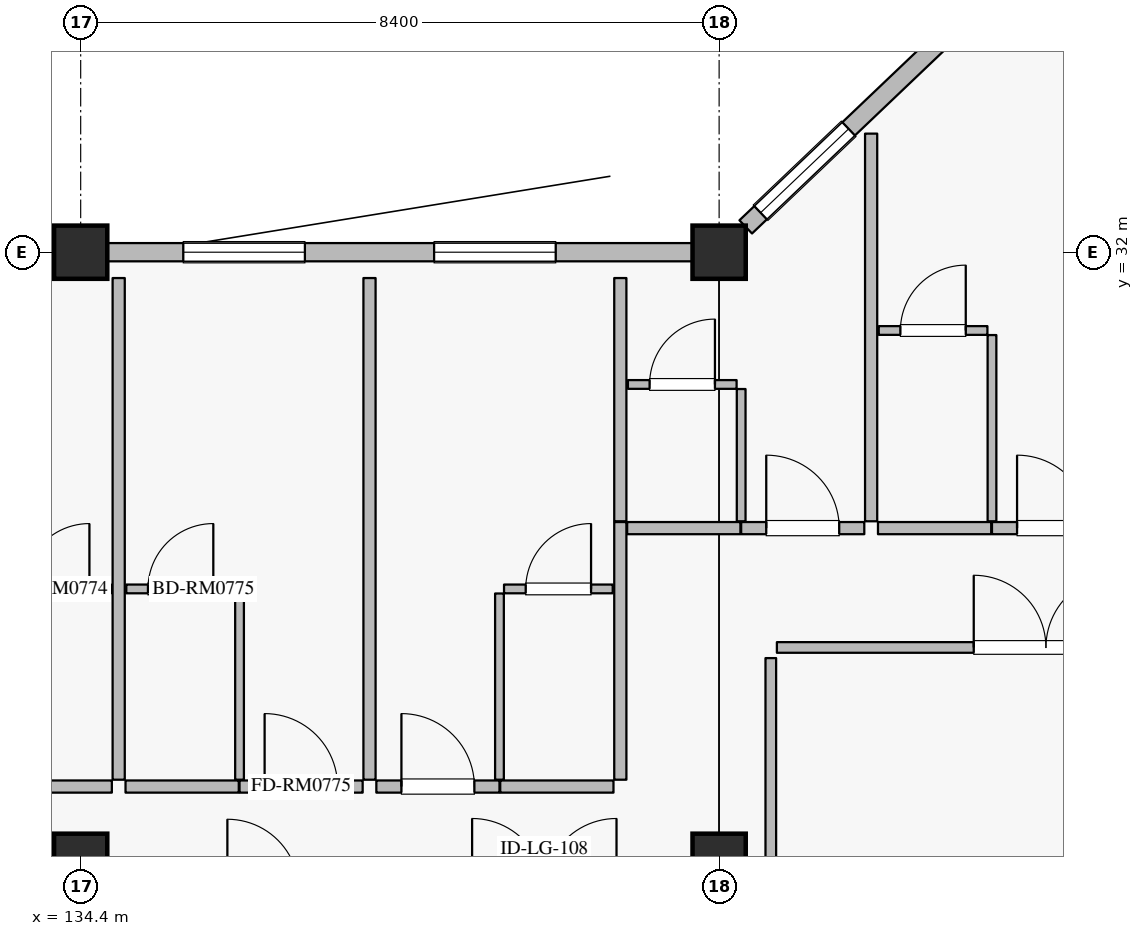
"""IFC4 building model, lengths in metres.
Left out: names, types, materials, properties, quantities, classifications, styles, units other than length and angle.
Written with IfcOpenShell. Run it as: python <this file> out.ifc"""

import sys

from ifc_helpers import new_model, si_unit, direction, frame, frame_2d, origin, origin_2d, place, context, subcontext, project, spatial, rectangle, extrude, element, fill, save


model = new_model("IFC4")
c1 = context("Model", 3, precision=1e-05, world=origin(), true_north=direction((0.0, 1.0)))
c2 = subcontext(c1, "Body", "Model", "MODEL_VIEW")
j1 = project(units=[si_unit("LENGTHUNIT", "METRE"), si_unit("PLANEANGLEUNIT", "RADIAN")], contexts=[c1])
p1 = place(None, origin())
s1 = spatial("IfcSite", under=j1, at=p1, CompositionType="ELEMENT")
p2 = place(p1, origin())
s2 = spatial("IfcBuilding", under=s1, at=p2, CompositionType="ELEMENT")
p3 = place(p2, frame((0.0, 0.0, 28.8)))
s3 = spatial("IfcBuildingStorey", under=s2, at=p3, CompositionType="ELEMENT", Elevation=28.8)
for number, where, z_axis, x_axis in (
    (1, (134.4, 32.0, 0.0), (0.0, 0.0, 1.0), (1.0, 0.0, 0.0)),
    (2, (142.8, 32.0, 0.0), (0.0, 0.0, 1.0), (1.0, 0.0, 0.0)),
    (3, (134.4, 24.0, 0.0), (0.0, 0.0, 1.0), (1.0, 0.0, 0.0)),
    (4, (142.8, 24.0, 0.0), (0.0, 0.0, 1.0), (1.0, 0.0, 0.0)),
):
    element("IfcColumn", number, at=place(p3, frame(where, z_axis=z_axis, x_axis=x_axis)), inside=s3, PredefinedType="COLUMN", context=c2, shape_type="SweptSolid", body=[
        extrude(rectangle(XDim=0.7, YDim=0.7, at=origin_2d()), origin(), (0.0, 0.0, 1.0), 3.6),
    ])
p4 = place(p3, frame((126.35, 32.0, 0.0), z_axis=(0.0, 0.0, 1.0), x_axis=(1.0, 0.0, 0.0)))
e5 = element("IfcWall", 5, at=p4, inside=s3, PredefinedType="SOLIDWALL", context=c2, shape_type="SweptSolid", body=[
    extrude(rectangle(XDim=7.7, YDim=0.24, at=frame_2d((3.85, 0.0))), origin(), (0.0, 0.0, 1.0), 2.93),
])
p5 = place(p4, frame((0.125, 0.0, 0.8)))
e6 = element("IfcOpeningElement", 6, at=p5, cuts=e5, PredefinedType="OPENING", context=c2, shape_type="SweptSolid", body=[
    extrude(rectangle(XDim=1.6, YDim=1.6, at=frame_2d((0.8, 0.8))), frame((0.0, 0.13, 0.0), z_axis=(0.0, -1.0, 0.0), x_axis=(1.0, 0.0, 0.0)), (0.0, 0.0, 1.0), 0.26),
])
p6 = place(p4, frame((2.8, 0.0, 0.8)))
e7 = element("IfcOpeningElement", 7, at=p6, cuts=e5, PredefinedType="OPENING", context=c2, shape_type="SweptSolid", body=[
    extrude(rectangle(XDim=1.6, YDim=1.6, at=frame_2d((0.8, 0.8))), frame((0.0, 0.13, 0.0), z_axis=(0.0, -1.0, 0.0), x_axis=(1.0, 0.0, 0.0)), (0.0, 0.0, 1.0), 0.26),
])
p7 = place(p4, frame((5.725, 0.0, 0.8)))
e8 = element("IfcOpeningElement", 8, at=p7, cuts=e5, PredefinedType="OPENING", context=c2, shape_type="SweptSolid", body=[
    extrude(rectangle(XDim=1.6, YDim=1.6, at=frame_2d((0.8, 0.8))), frame((0.0, 0.13, 0.0), z_axis=(0.0, -1.0, 0.0), x_axis=(1.0, 0.0, 0.0)), (0.0, 0.0, 1.0), 0.26),
])
p8 = place(p3, frame((134.75, 32.0, 0.0), z_axis=(0.0, 0.0, 1.0), x_axis=(1.0, 0.0, 0.0)))
e9 = element("IfcWall", 9, at=p8, inside=s3, PredefinedType="SOLIDWALL", context=c2, shape_type="SweptSolid", body=[
    extrude(rectangle(XDim=7.7, YDim=0.24, at=frame_2d((3.85, 0.0))), origin(), (0.0, 0.0, 1.0), 2.93),
])
p9 = place(p8, frame((1.0, 0.0, 0.8)))
e10 = element("IfcOpeningElement", 10, at=p9, cuts=e9, PredefinedType="OPENING", context=c2, shape_type="SweptSolid", body=[
    extrude(rectangle(XDim=1.6, YDim=1.6, at=frame_2d((0.8, 0.8))), frame((0.0, 0.13, 0.0), z_axis=(0.0, -1.0, 0.0), x_axis=(1.0, 0.0, 0.0)), (0.0, 0.0, 1.0), 0.26),
])
p10 = place(p8, frame((4.3, 0.0, 0.8)))
e11 = element("IfcOpeningElement", 11, at=p10, cuts=e9, PredefinedType="OPENING", context=c2, shape_type="SweptSolid", body=[
    extrude(rectangle(XDim=1.6, YDim=1.6, at=frame_2d((0.8, 0.8))), frame((0.0, 0.13, 0.0), z_axis=(0.0, -1.0, 0.0), x_axis=(1.0, 0.0, 0.0)), (0.0, 0.0, 1.0), 0.26),
])
p11 = place(p3, frame((143.15, 32.333, 0.0), z_axis=(0.0, 0.0, 1.0), x_axis=(0.724116091282, 0.689678103427, 0.0)))
e12 = element("IfcWall", 12, at=p11, inside=s3, PredefinedType="SOLIDWALL", context=c2, shape_type="SweptSolid", body=[
    extrude(rectangle(XDim=10.634, YDim=0.24, at=frame_2d((5.317, 0.0))), origin(), (0.0, 0.0, 1.0), 2.93),
])
p12 = place(p11, frame((0.27, 0.0, 0.8)))
e13 = element("IfcOpeningElement", 13, at=p12, cuts=e12, PredefinedType="OPENING", context=c2, shape_type="SweptSolid", body=[
    extrude(rectangle(XDim=1.6, YDim=1.6, at=frame_2d((0.8, 0.8))), frame((0.0, 0.13, 0.0), z_axis=(0.0, -1.0, 0.0), x_axis=(1.0, 0.0, 0.0)), (0.0, 0.0, 1.0), 0.26),
])
p13 = place(p11, frame((3.757, 0.0, 0.8)))
e14 = element("IfcOpeningElement", 14, at=p13, cuts=e12, PredefinedType="OPENING", context=c2, shape_type="SweptSolid", body=[
    extrude(rectangle(XDim=1.6, YDim=1.6, at=frame_2d((0.8, 0.8))), frame((0.0, 0.13, 0.0), z_axis=(0.0, -1.0, 0.0), x_axis=(1.0, 0.0, 0.0)), (0.0, 0.0, 1.0), 0.26),
])
p14 = place(p11, frame((8.004, 0.0, 0.8)))
e15 = element("IfcOpeningElement", 15, at=p14, cuts=e12, PredefinedType="OPENING", context=c2, shape_type="SweptSolid", body=[
    extrude(rectangle(XDim=1.6, YDim=1.6, at=frame_2d((0.8, 0.8))), frame((0.0, 0.13, 0.0), z_axis=(0.0, -1.0, 0.0), x_axis=(1.0, 0.0, 0.0)), (0.0, 0.0, 1.0), 0.26),
])
p15 = place(p3, frame((133.32, 24.97, 0.0), z_axis=(0.0, 0.0, 1.0), x_axis=(1.0, 0.0, 0.0)))
e16 = element("IfcWall", 16, at=p15, inside=s3, PredefinedType="PARTITIONING", context=c2, shape_type="SweptSolid", body=[
    extrude(rectangle(XDim=1.49, YDim=0.16, at=frame_2d((0.745, 0.0))), origin(), (0.0, 0.0, 1.0), 3.365),
])
p16 = place(p3, frame((133.37, 27.57, 0.0), z_axis=(0.0, 0.0, 1.0), x_axis=(1.0, 0.0, 0.0)))
e17 = element("IfcWall", 17, at=p16, inside=s3, PredefinedType="PARTITIONING", context=c2, shape_type="SweptSolid", body=[
    extrude(rectangle(XDim=1.43, YDim=0.115, at=frame_2d((0.715, 0.0))), origin(), (0.0, 0.0, 1.0), 3.365),
])
p17 = place(p16, frame((0.285, 0.0, 0.0)))
e18 = element("IfcOpeningElement", 18, at=p17, cuts=e17, PredefinedType="OPENING", context=c2, shape_type="SweptSolid", body=[
    extrude(rectangle(XDim=0.86, YDim=2.12, at=frame_2d((0.43, 1.06))), frame((0.0, 0.067, 0.0), z_axis=(0.0, -1.0, 0.0), x_axis=(1.0, 0.0, 0.0)), (0.0, 0.0, 1.0), 0.135),
])
p18 = place(p3, frame((134.99, 24.97, 0.0), z_axis=(0.0, 0.0, 1.0), x_axis=(1.0, 0.0, 0.0)))
e19 = element("IfcWall", 19, at=p18, inside=s3, PredefinedType="PARTITIONING", context=c2, shape_type="SweptSolid", body=[
    extrude(rectangle(XDim=1.49, YDim=0.16, at=frame_2d((0.745, 0.0))), origin(), (0.0, 0.0, 1.0), 3.365),
])
p19 = place(p3, frame((136.49, 24.97, 0.0), z_axis=(0.0, 0.0, 1.0), x_axis=(1.0, 0.0, 0.0)))
e20 = element("IfcWall", 20, at=p19, inside=s3, PredefinedType="PARTITIONING", context=c2, shape_type="SweptSolid", body=[
    extrude(rectangle(XDim=1.62, YDim=0.16, at=frame_2d((0.81, 0.0))), origin(), (0.0, 0.0, 1.0), 3.365),
])
p20 = place(p19, frame((0.33, 0.0, 0.0)))
e21 = element("IfcOpeningElement", 21, at=p20, cuts=e20, PredefinedType="OPENING", context=c2, shape_type="SweptSolid", body=[
    extrude(rectangle(XDim=0.96, YDim=2.2, at=frame_2d((0.48, 1.1))), frame((0.0, 0.09, 0.0), z_axis=(0.0, -1.0, 0.0), x_axis=(1.0, 0.0, 0.0)), (0.0, 0.0, 1.0), 0.18),
])
p21 = place(p3, frame((136.49, 25.06, 0.0), z_axis=(0.0, 0.0, 1.0), x_axis=(0.0, 1.0, 0.0)))
e22 = element("IfcWall", 22, at=p21, inside=s3, PredefinedType="PARTITIONING", context=c2, shape_type="SweptSolid", body=[
    extrude(rectangle(XDim=2.45, YDim=0.115, at=frame_2d((1.225, 0.0))), origin(), (0.0, 0.0, 1.0), 3.365),
])
p22 = place(p3, frame((135.0, 27.57, 0.0), z_axis=(0.0, 0.0, 1.0), x_axis=(1.0, 0.0, 0.0)))
e23 = element("IfcWall", 23, at=p22, inside=s3, PredefinedType="PARTITIONING", context=c2, shape_type="SweptSolid", body=[
    extrude(rectangle(XDim=1.43, YDim=0.115, at=frame_2d((0.715, 0.0))), origin(), (0.0, 0.0, 1.0), 3.365),
])
p23 = place(p22, frame((0.285, 0.0, 0.0)))
e24 = element("IfcOpeningElement", 24, at=p23, cuts=e23, PredefinedType="OPENING", context=c2, shape_type="SweptSolid", body=[
    extrude(rectangle(XDim=0.86, YDim=2.12, at=frame_2d((0.43, 1.06))), frame((0.0, 0.067, 0.0), z_axis=(0.0, -1.0, 0.0), x_axis=(1.0, 0.0, 0.0)), (0.0, 0.0, 1.0), 0.135),
])
p24 = place(p3, frame((134.9, 25.06, 0.0), z_axis=(0.0, 0.0, 1.0), x_axis=(0.0, 1.0, 0.0)))
e25 = element("IfcWall", 25, at=p24, inside=s3, PredefinedType="PARTITIONING", context=c2, shape_type="SweptSolid", body=[
    extrude(rectangle(XDim=6.6, YDim=0.16, at=frame_2d((3.3, 0.0))), origin(), (0.0, 0.0, 1.0), 3.365),
])
p25 = place(p3, frame((138.29, 24.97, 0.0), z_axis=(0.0, 0.0, 1.0), x_axis=(1.0, 0.0, 0.0)))
e26 = element("IfcWall", 26, at=p25, inside=s3, PredefinedType="PARTITIONING", context=c2, shape_type="SweptSolid", body=[
    extrude(rectangle(XDim=1.62, YDim=0.16, at=frame_2d((0.81, 0.0))), origin(), (0.0, 0.0, 1.0), 3.365),
])
p26 = place(p25, frame((0.33, 0.0, 0.0)))
e27 = element("IfcOpeningElement", 27, at=p26, cuts=e26, PredefinedType="OPENING", context=c2, shape_type="SweptSolid", body=[
    extrude(rectangle(XDim=0.96, YDim=2.2, at=frame_2d((0.48, 1.1))), frame((0.0, 0.09, 0.0), z_axis=(0.0, -1.0, 0.0), x_axis=(1.0, 0.0, 0.0)), (0.0, 0.0, 1.0), 0.18),
])
p27 = place(p3, frame((139.92, 24.97, 0.0), z_axis=(0.0, 0.0, 1.0), x_axis=(1.0, 0.0, 0.0)))
e28 = element("IfcWall", 28, at=p27, inside=s3, PredefinedType="PARTITIONING", context=c2, shape_type="SweptSolid", body=[
    extrude(rectangle(XDim=1.49, YDim=0.16, at=frame_2d((0.745, 0.0))), origin(), (0.0, 0.0, 1.0), 3.365),
])
p28 = place(p3, frame((139.91, 25.06, 0.0), z_axis=(0.0, 0.0, 1.0), x_axis=(0.0, 1.0, 0.0)))
e29 = element("IfcWall", 29, at=p28, inside=s3, PredefinedType="PARTITIONING", context=c2, shape_type="SweptSolid", body=[
    extrude(rectangle(XDim=2.45, YDim=0.115, at=frame_2d((1.225, 0.0))), origin(), (0.0, 0.0, 1.0), 3.365),
])
p29 = place(p3, frame((139.97, 27.57, 0.0), z_axis=(0.0, 0.0, 1.0), x_axis=(1.0, 0.0, 0.0)))
e30 = element("IfcWall", 30, at=p29, inside=s3, PredefinedType="PARTITIONING", context=c2, shape_type="SweptSolid", body=[
    extrude(rectangle(XDim=1.43, YDim=0.115, at=frame_2d((0.715, 0.0))), origin(), (0.0, 0.0, 1.0), 3.365),
])
p30 = place(p29, frame((0.285, 0.0, 0.0)))
e31 = element("IfcOpeningElement", 31, at=p30, cuts=e30, PredefinedType="OPENING", context=c2, shape_type="SweptSolid", body=[
    extrude(rectangle(XDim=0.86, YDim=2.12, at=frame_2d((0.43, 1.06))), frame((0.0, 0.067, 0.0), z_axis=(0.0, -1.0, 0.0), x_axis=(1.0, 0.0, 0.0)), (0.0, 0.0, 1.0), 0.135),
])
p31 = place(p3, frame((138.2, 25.06, 0.0), z_axis=(0.0, 0.0, 1.0), x_axis=(0.0, 1.0, 0.0)))
e32 = element("IfcWall", 32, at=p31, inside=s3, PredefinedType="PARTITIONING", context=c2, shape_type="SweptSolid", body=[
    extrude(rectangle(XDim=6.6, YDim=0.16, at=frame_2d((3.3, 0.0))), origin(), (0.0, 0.0, 1.0), 3.365),
])
p32 = place(p3, frame((141.5, 25.06, 0.0), z_axis=(0.0, 0.0, 1.0), x_axis=(0.0, 1.0, 0.0)))
e33 = element("IfcWall", 33, at=p32, inside=s3, PredefinedType="PARTITIONING", context=c2, shape_type="SweptSolid", body=[
    extrude(rectangle(XDim=3.39, YDim=0.16, at=frame_2d((1.695, 0.0))), origin(), (0.0, 0.0, 1.0), 3.365),
])
p33 = place(p3, frame((141.59, 28.37, 0.0), z_axis=(0.0, 0.0, 1.0), x_axis=(1.0, 0.0, 0.0)))
e34 = element("IfcWall", 34, at=p33, inside=s3, PredefinedType="PARTITIONING", context=c2, shape_type="SweptSolid", body=[
    extrude(rectangle(XDim=1.49, YDim=0.16, at=frame_2d((0.745, 0.0))), origin(), (0.0, 0.0, 1.0), 3.365),
])
p34 = place(p3, frame((143.09, 28.37, 0.0), z_axis=(0.0, 0.0, 1.0), x_axis=(1.0, 0.0, 0.0)))
e35 = element("IfcWall", 35, at=p34, inside=s3, PredefinedType="PARTITIONING", context=c2, shape_type="SweptSolid", body=[
    extrude(rectangle(XDim=1.62, YDim=0.16, at=frame_2d((0.81, 0.0))), origin(), (0.0, 0.0, 1.0), 3.365),
])
p35 = place(p34, frame((0.33, 0.0, 0.0)))
e36 = element("IfcOpeningElement", 36, at=p35, cuts=e35, PredefinedType="OPENING", context=c2, shape_type="SweptSolid", body=[
    extrude(rectangle(XDim=0.96, YDim=2.2, at=frame_2d((0.48, 1.1))), frame((0.0, 0.09, 0.0), z_axis=(0.0, -1.0, 0.0), x_axis=(1.0, 0.0, 0.0)), (0.0, 0.0, 1.0), 0.18),
])
p36 = place(p3, frame((143.09, 28.46, 0.0), z_axis=(0.0, 0.0, 1.0), x_axis=(0.0, 1.0, 0.0)))
e37 = element("IfcWall", 37, at=p36, inside=s3, PredefinedType="PARTITIONING", context=c2, shape_type="SweptSolid", body=[
    extrude(rectangle(XDim=1.74, YDim=0.115, at=frame_2d((0.87, 0.0))), origin(), (0.0, 0.0, 1.0), 3.365),
])
p37 = place(p3, frame((141.6, 30.26, 0.0), z_axis=(0.0, 0.0, 1.0), x_axis=(1.0, 0.0, 0.0)))
e38 = element("IfcWall", 38, at=p37, inside=s3, PredefinedType="PARTITIONING", context=c2, shape_type="SweptSolid", body=[
    extrude(rectangle(XDim=1.43, YDim=0.115, at=frame_2d((0.715, 0.0))), origin(), (0.0, 0.0, 1.0), 3.365),
])
p38 = place(p37, frame((0.285, 0.0, 0.0)))
e39 = element("IfcOpeningElement", 39, at=p38, cuts=e38, PredefinedType="OPENING", context=c2, shape_type="SweptSolid", body=[
    extrude(rectangle(XDim=0.86, YDim=2.12, at=frame_2d((0.43, 1.06))), frame((0.0, 0.067, 0.0), z_axis=(0.0, -1.0, 0.0), x_axis=(1.0, 0.0, 0.0)), (0.0, 0.0, 1.0), 0.135),
])
p39 = place(p3, frame((141.5, 28.46, 0.0), z_axis=(0.0, 0.0, 1.0), x_axis=(0.0, 1.0, 0.0)))
e40 = element("IfcWall", 40, at=p39, inside=s3, PredefinedType="PARTITIONING", context=c2, shape_type="SweptSolid", body=[
    extrude(rectangle(XDim=3.2, YDim=0.16, at=frame_2d((1.6, 0.0))), origin(), (0.0, 0.0, 1.0), 3.365),
])
p40 = place(p3, frame((144.89, 28.37, 0.0), z_axis=(0.0, 0.0, 1.0), x_axis=(1.0, 0.0, 0.0)))
e41 = element("IfcWall", 41, at=p40, inside=s3, PredefinedType="PARTITIONING", context=c2, shape_type="SweptSolid", body=[
    extrude(rectangle(XDim=1.49, YDim=0.16, at=frame_2d((0.745, 0.0))), origin(), (0.0, 0.0, 1.0), 3.365),
])
p41 = place(p3, frame((146.39, 28.37, 0.0), z_axis=(0.0, 0.0, 1.0), x_axis=(1.0, 0.0, 0.0)))
e42 = element("IfcWall", 42, at=p41, inside=s3, PredefinedType="PARTITIONING", context=c2, shape_type="SweptSolid", body=[
    extrude(rectangle(XDim=1.62, YDim=0.16, at=frame_2d((0.81, 0.0))), origin(), (0.0, 0.0, 1.0), 3.365),
])
p42 = place(p41, frame((0.33, 0.0, 0.0)))
e43 = element("IfcOpeningElement", 43, at=p42, cuts=e42, PredefinedType="OPENING", context=c2, shape_type="SweptSolid", body=[
    extrude(rectangle(XDim=0.96, YDim=2.2, at=frame_2d((0.48, 1.1))), frame((0.0, 0.09, 0.0), z_axis=(0.0, -1.0, 0.0), x_axis=(1.0, 0.0, 0.0)), (0.0, 0.0, 1.0), 0.18),
])
p43 = place(p3, frame((146.39, 28.46, 0.0), z_axis=(0.0, 0.0, 1.0), x_axis=(0.0, 1.0, 0.0)))
e44 = element("IfcWall", 44, at=p43, inside=s3, PredefinedType="PARTITIONING", context=c2, shape_type="SweptSolid", body=[
    extrude(rectangle(XDim=2.45, YDim=0.115, at=frame_2d((1.225, 0.0))), origin(), (0.0, 0.0, 1.0), 3.365),
])
p44 = place(p3, frame((144.9, 30.97, 0.0), z_axis=(0.0, 0.0, 1.0), x_axis=(1.0, 0.0, 0.0)))
e45 = element("IfcWall", 45, at=p44, inside=s3, PredefinedType="PARTITIONING", context=c2, shape_type="SweptSolid", body=[
    extrude(rectangle(XDim=1.43, YDim=0.115, at=frame_2d((0.715, 0.0))), origin(), (0.0, 0.0, 1.0), 3.365),
])
p45 = place(p44, frame((0.285, 0.0, 0.0)))
e46 = element("IfcOpeningElement", 46, at=p45, cuts=e45, PredefinedType="OPENING", context=c2, shape_type="SweptSolid", body=[
    extrude(rectangle(XDim=0.86, YDim=2.12, at=frame_2d((0.43, 1.06))), frame((0.0, 0.067, 0.0), z_axis=(0.0, -1.0, 0.0), x_axis=(1.0, 0.0, 0.0)), (0.0, 0.0, 1.0), 0.135),
])
p46 = place(p3, frame((144.8, 28.46, 0.0), z_axis=(0.0, 0.0, 1.0), x_axis=(0.0, 1.0, 0.0)))
e47 = element("IfcWall", 47, at=p46, inside=s3, PredefinedType="PARTITIONING", context=c2, shape_type="SweptSolid", body=[
    extrude(rectangle(XDim=5.1, YDim=0.16, at=frame_2d((2.55, 0.0))), origin(), (0.0, 0.0, 1.0), 3.365),
])
p47 = place(p3, frame((143.56, 26.8, 0.0), z_axis=(0.0, 0.0, 1.0), x_axis=(1.0, 0.0, 0.0)))
e48 = element("IfcWall", 48, at=p47, inside=s3, PredefinedType="PARTITIONING", context=c2, shape_type="SweptSolid", body=[
    extrude(rectangle(XDim=7.08, YDim=0.14, at=frame_2d((3.54, 0.0))), origin(), (0.0, 0.0, 1.0), 3.365),
])
p48 = place(p47, frame((2.59, 0.0, 0.0)))
e49 = element("IfcOpeningElement", 49, at=p48, cuts=e48, PredefinedType="OPENING", context=c2, shape_type="SweptSolid", body=[
    extrude(rectangle(XDim=1.9, YDim=2.4, at=frame_2d((0.95, 1.2))), frame((0.0, 0.08, 0.0), z_axis=(0.0, -1.0, 0.0), x_axis=(1.0, 0.0, 0.0)), (0.0, 0.0, 1.0), 0.16),
])
p49 = place(p3, frame((143.48, 23.45, 0.0), z_axis=(0.0, 0.0, 1.0), x_axis=(0.0, 1.0, 0.0)))
e50 = element("IfcWall", 50, at=p49, inside=s3, PredefinedType="PARTITIONING", context=c2, shape_type="SweptSolid", body=[
    extrude(rectangle(XDim=3.21, YDim=0.14, at=frame_2d((1.605, 0.0))), origin(), (0.0, 0.0, 1.0), 3.365),
])
p50 = place(p9, origin())
e51 = element("IfcWindow", 51, at=p50, inside=s3, PartitioningType="SINGLE_PANEL", PredefinedType="WINDOW", context=c2, shape_type="SweptSolid", body=[
    extrude(rectangle(XDim=1.6, YDim=1.6, at=frame_2d((0.8, 0.8))), frame((0.0, 0.03, 0.0), z_axis=(0.0, -1.0, 0.0), x_axis=(1.0, 0.0, 0.0)), (0.0, 0.0, 1.0), 0.06),
])
fill(e10, e51)
p51 = place(p10, origin())
e52 = element("IfcWindow", 52, at=p51, inside=s3, PartitioningType="SINGLE_PANEL", PredefinedType="WINDOW", context=c2, shape_type="SweptSolid", body=[
    extrude(rectangle(XDim=1.6, YDim=1.6, at=frame_2d((0.8, 0.8))), frame((0.0, 0.03, 0.0), z_axis=(0.0, -1.0, 0.0), x_axis=(1.0, 0.0, 0.0)), (0.0, 0.0, 1.0), 0.06),
])
fill(e11, e52)
p52 = place(p12, origin())
e53 = element("IfcWindow", 53, at=p52, inside=s3, PartitioningType="SINGLE_PANEL", PredefinedType="WINDOW", context=c2, shape_type="SweptSolid", body=[
    extrude(rectangle(XDim=1.6, YDim=1.6, at=frame_2d((0.8, 0.8))), frame((0.0, 0.03, 0.0), z_axis=(0.0, -1.0, 0.0), x_axis=(1.0, 0.0, 0.0)), (0.0, 0.0, 1.0), 0.06),
])
fill(e13, e53)
p53 = place(p17, origin())
e54 = element("IfcDoor", 54, at=p53, inside=s3, OperationType="SINGLE_SWING_RIGHT", PredefinedType="DOOR", context=c2, shape_type="SweptSolid", body=[
    extrude(rectangle(XDim=0.86, YDim=2.12, at=frame_2d((0.43, 1.06))), frame((0.0, 0.025, 0.0), z_axis=(0.0, -1.0, 0.0), x_axis=(1.0, 0.0, 0.0)), (0.0, 0.0, 1.0), 0.05),
])
fill(e18, e54)
p54 = place(p20, origin())
e55 = element("IfcDoor", 55, at=p54, inside=s3, OperationType="SINGLE_SWING_LEFT", PredefinedType="DOOR", context=c2, shape_type="SweptSolid", body=[
    extrude(rectangle(XDim=0.96, YDim=2.2, at=frame_2d((0.48, 1.1))), frame((0.0, 0.025, 0.0), z_axis=(0.0, -1.0, 0.0), x_axis=(1.0, 0.0, 0.0)), (0.0, 0.0, 1.0), 0.05),
])
fill(e21, e55)
p55 = place(p23, origin())
e56 = element("IfcDoor", 56, at=p55, inside=s3, OperationType="SINGLE_SWING_RIGHT", PredefinedType="DOOR", context=c2, shape_type="SweptSolid", body=[
    extrude(rectangle(XDim=0.86, YDim=2.12, at=frame_2d((0.43, 1.06))), frame((0.0, 0.025, 0.0), z_axis=(0.0, -1.0, 0.0), x_axis=(1.0, 0.0, 0.0)), (0.0, 0.0, 1.0), 0.05),
])
fill(e24, e56)
p56 = place(p26, origin())
e57 = element("IfcDoor", 57, at=p56, inside=s3, OperationType="SINGLE_SWING_LEFT", PredefinedType="DOOR", context=c2, shape_type="SweptSolid", body=[
    extrude(rectangle(XDim=0.96, YDim=2.2, at=frame_2d((0.48, 1.1))), frame((0.0, 0.025, 0.0), z_axis=(0.0, -1.0, 0.0), x_axis=(1.0, 0.0, 0.0)), (0.0, 0.0, 1.0), 0.05),
])
fill(e27, e57)
p57 = place(p30, origin())
e58 = element("IfcDoor", 58, at=p57, inside=s3, OperationType="SINGLE_SWING_RIGHT", PredefinedType="DOOR", context=c2, shape_type="SweptSolid", body=[
    extrude(rectangle(XDim=0.86, YDim=2.12, at=frame_2d((0.43, 1.06))), frame((0.0, 0.025, 0.0), z_axis=(0.0, -1.0, 0.0), x_axis=(1.0, 0.0, 0.0)), (0.0, 0.0, 1.0), 0.05),
])
fill(e31, e58)
p58 = place(p35, origin())
e59 = element("IfcDoor", 59, at=p58, inside=s3, OperationType="SINGLE_SWING_LEFT", PredefinedType="DOOR", context=c2, shape_type="SweptSolid", body=[
    extrude(rectangle(XDim=0.96, YDim=2.2, at=frame_2d((0.48, 1.1))), frame((0.0, 0.025, 0.0), z_axis=(0.0, -1.0, 0.0), x_axis=(1.0, 0.0, 0.0)), (0.0, 0.0, 1.0), 0.05),
])
fill(e36, e59)
p59 = place(p38, origin())
e60 = element("IfcDoor", 60, at=p59, inside=s3, OperationType="SINGLE_SWING_RIGHT", PredefinedType="DOOR", context=c2, shape_type="SweptSolid", body=[
    extrude(rectangle(XDim=0.86, YDim=2.12, at=frame_2d((0.43, 1.06))), frame((0.0, 0.025, 0.0), z_axis=(0.0, -1.0, 0.0), x_axis=(1.0, 0.0, 0.0)), (0.0, 0.0, 1.0), 0.05),
])
fill(e39, e60)
p60 = place(p42, origin())
e61 = element("IfcDoor", 61, at=p60, inside=s3, OperationType="SINGLE_SWING_LEFT", PredefinedType="DOOR", context=c2, shape_type="SweptSolid", body=[
    extrude(rectangle(XDim=0.96, YDim=2.2, at=frame_2d((0.48, 1.1))), frame((0.0, 0.025, 0.0), z_axis=(0.0, -1.0, 0.0), x_axis=(1.0, 0.0, 0.0)), (0.0, 0.0, 1.0), 0.05),
])
fill(e43, e61)
p61 = place(p45, origin())
e62 = element("IfcDoor", 62, at=p61, inside=s3, OperationType="SINGLE_SWING_RIGHT", PredefinedType="DOOR", context=c2, shape_type="SweptSolid", body=[
    extrude(rectangle(XDim=0.86, YDim=2.12, at=frame_2d((0.43, 1.06))), frame((0.0, 0.025, 0.0), z_axis=(0.0, -1.0, 0.0), x_axis=(1.0, 0.0, 0.0)), (0.0, 0.0, 1.0), 0.05),
])
fill(e46, e62)
p62 = place(p48, origin())
e63 = element("IfcDoor", 63, at=p62, inside=s3, OperationType="DOUBLE_DOOR_SINGLE_SWING", PredefinedType="DOOR", context=c2, shape_type="SweptSolid", body=[
    extrude(rectangle(XDim=1.9, YDim=2.4, at=frame_2d((0.95, 1.2))), frame((0.0, 0.025, 0.0), z_axis=(0.0, -1.0, 0.0), x_axis=(1.0, 0.0, 0.0)), (0.0, 0.0, 1.0), 0.05),
])
fill(e49, e63)
save(model, sys.argv[1])
